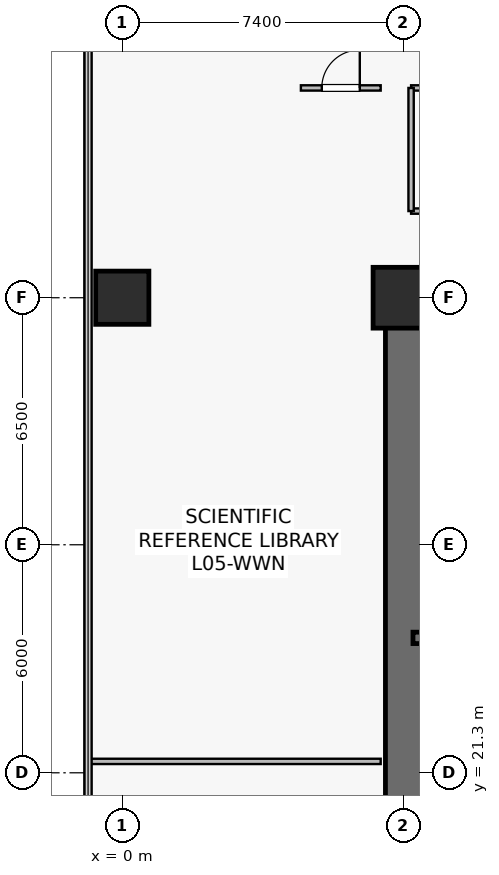
"""IFC4 building model, lengths in metres.
Left out: names, types, materials, properties, quantities, classifications, styles, units other than length and angle.
Written with IfcOpenShell. Run it as: python <this file> out.ifc"""

import sys

from ifc_helpers import new_model, si_unit, direction, frame, frame_2d, origin, origin_2d, place, context, subcontext, project, spatial, rectangle, extrude, source, transform, mapped, element, fill, save


model = new_model("IFC4")
c1 = context("Model", 3, precision=1e-05, world=origin(), true_north=direction((0.0, 1.0)))
c2 = subcontext(c1, "Body", "Model", "MODEL_VIEW")
j1 = project(units=[si_unit("LENGTHUNIT", "METRE"), si_unit("PLANEANGLEUNIT", "RADIAN")], contexts=[c1])
p1 = place(None, origin())
s1 = spatial("IfcSite", under=j1, at=p1, CompositionType="ELEMENT")
p2 = place(p1, origin())
s2 = spatial("IfcBuilding", under=s1, at=p2, CompositionType="ELEMENT")
p3 = place(p2, frame((0.0, 0.0, 19.8)))
s3 = spatial("IfcBuildingStorey", under=s2, at=p3, CompositionType="ELEMENT", Elevation=19.8)
p4 = place(p3, frame((6.925, 33.8, 0.0), z_axis=(0.0, 0.0, 1.0), x_axis=(1.0, 0.0, 0.0)))
e1 = element("IfcWall", 1, at=p4, inside=s3, PredefinedType="SHEAR", context=c2, shape_type="SweptSolid", body=[
    extrude(rectangle(XDim=15.75, YDim=0.95, at=frame_2d((7.875, 0.0))), origin(), (0.0, 0.0, 1.0), 5.08),
])
p5 = place(p4, frame((8.525, 0.0, 0.0)))
e2 = element("IfcOpeningElement", 2, at=p5, cuts=e1, PredefinedType="OPENING", context=c2, shape_type="SweptSolid", body=[
    extrude(rectangle(XDim=0.95, YDim=2.15, at=frame_2d((0.475, 1.075))), frame((0.0, 0.485, 0.0), z_axis=(0.0, -1.0, 0.0), x_axis=(1.0, 0.0, 0.0)), (0.0, 0.0, 1.0), 0.97),
])
p6 = place(p4, frame((12.065, 0.0, 0.0)))
e3 = element("IfcOpeningElement", 3, at=p6, cuts=e1, PredefinedType="OPENING", context=c2, shape_type="SweptSolid", body=[
    extrude(rectangle(XDim=0.95, YDim=2.15, at=frame_2d((0.475, 1.075))), frame((0.0, 0.485, 0.0), z_axis=(0.0, -1.0, 0.0), x_axis=(1.0, 0.0, 0.0)), (0.0, 0.0, 1.0), 0.97),
])
p7 = place(p3, frame((7.4, 15.275, 0.0), z_axis=(0.0, 0.0, 1.0), x_axis=(0.0, 1.0, 0.0)))
e4 = element("IfcWall", 4, at=p7, inside=s3, PredefinedType="SHEAR", context=c2, shape_type="SweptSolid", body=[
    extrude(rectangle(XDim=18.05, YDim=0.95, at=frame_2d((9.025, 0.0))), origin(), (0.0, 0.0, 1.0), 5.08),
])
p8 = place(p3, frame((7.65, 24.85, 0.0), z_axis=(0.0, 0.0, 1.0), x_axis=(1.0, 0.0, 0.0)))
e5 = element("IfcWall", 5, at=p8, inside=s3, PredefinedType="SHEAR", context=c2, shape_type="SweptSolid", body=[
    extrude(rectangle(XDim=3.8, YDim=0.3, at=frame_2d((1.9, 0.0))), origin(), (0.0, 0.0, 1.0), 5.08),
])
m1 = source(origin(), c2, "Body", "SweptSolid", [
    extrude(rectangle(XDim=1.6, YDim=1.6, at=origin_2d()), origin(), (0.0, 0.0, 1.0), 5.4),
])
p9 = place(p3, frame((7.4, 33.8, 0.0), z_axis=(0.0, 0.0, 1.0), x_axis=(1.0, 0.0, 0.0)))
e6 = element("IfcColumn", 6, at=p9, inside=s3, PredefinedType="COLUMN", context=c2, shape_type="MappedRepresentation", body=[
    mapped(m1, transform((0.0, 0.0, 0.0), scale=1.0)),
])
m2 = source(origin(), c2, "Body", "SweptSolid", [
    extrude(rectangle(XDim=1.4, YDim=1.4, at=origin_2d()), origin(), (0.0, 0.0, 1.0), 5.4),
])
p10 = place(p3, frame((0.0, 33.8, 0.0), z_axis=(0.0, 0.0, 1.0), x_axis=(1.0, 0.0, 0.0)))
e7 = element("IfcColumn", 7, at=p10, inside=s3, PredefinedType="COLUMN", context=c2, shape_type="MappedRepresentation", body=[
    mapped(m2, transform((0.0, 0.0, 0.0), scale=1.0)),
])
p11 = place(p3, frame((7.6, 39.32, 0.0), z_axis=(0.0, 0.0, 1.0), x_axis=(1.0, 0.0, 0.0)))
e8 = element("IfcWall", 8, at=p11, inside=s3, PredefinedType="PARTITIONING", context=c2, shape_type="SweptSolid", body=[
    extrude(rectangle(XDim=14.45, YDim=0.14, at=frame_2d((7.225, 0.0))), origin(), (0.0, 0.0, 1.0), 4.365),
])
p12 = place(p11, frame((6.675, 0.0, 0.0)))
e9 = element("IfcOpeningElement", 9, at=p12, cuts=e8, PredefinedType="OPENING", context=c2, shape_type="SweptSolid", body=[
    extrude(rectangle(XDim=1.1, YDim=2.18, at=frame_2d((0.55, 1.09))), frame((0.0, 0.08, 0.0), z_axis=(0.0, -1.0, 0.0), x_axis=(1.0, 0.0, 0.0)), (0.0, 0.0, 1.0), 0.16),
])
p13 = place(p3, frame((7.6, 36.08, 0.0), z_axis=(0.0, 0.0, 1.0), x_axis=(1.0, 0.0, 0.0)))
e10 = element("IfcWall", 10, at=p13, inside=s3, PredefinedType="PARTITIONING", context=c2, shape_type="SweptSolid", body=[
    extrude(rectangle(XDim=14.45, YDim=0.14, at=frame_2d((7.225, 0.0))), origin(), (0.0, 0.0, 1.0), 4.365),
])
p14 = place(p3, frame((7.6, 36.08, 0.0), z_axis=(0.0, 0.0, 1.0), x_axis=(0.0, 1.0, 0.0)))
e11 = element("IfcWall", 11, at=p14, inside=s3, PredefinedType="PARTITIONING", context=c2, shape_type="SweptSolid", body=[
    extrude(rectangle(XDim=3.24, YDim=0.14, at=frame_2d((1.62, 0.0))), origin(), (0.0, 0.0, 1.0), 4.365),
])
p15 = place(p3, frame((-0.85, 21.6, 0.0), z_axis=(0.0, 0.0, 1.0), x_axis=(1.0, 0.0, 0.0)))
e12 = element("IfcWall", 12, at=p15, inside=s3, PredefinedType="PARTITIONING", context=c2, shape_type="SweptSolid", body=[
    extrude(rectangle(XDim=7.65, YDim=0.14, at=frame_2d((3.825, 0.0))), origin(), (0.0, 0.0, 1.0), 4.465),
])
p16 = place(p3, frame((4.7, 39.32, 0.0), z_axis=(0.0, 0.0, 1.0), x_axis=(1.0, 0.0, 0.0)))
e13 = element("IfcWall", 13, at=p16, inside=s3, PredefinedType="PARTITIONING", context=c2, shape_type="SweptSolid", body=[
    extrude(rectangle(XDim=2.1, YDim=0.14, at=frame_2d((1.05, 0.0))), origin(), (0.0, 0.0, 1.0), 5.08),
])
p17 = place(p16, frame((0.55, 0.0, 0.0)))
e14 = element("IfcOpeningElement", 14, at=p17, cuts=e13, PredefinedType="OPENING", context=c2, shape_type="SweptSolid", body=[
    extrude(rectangle(XDim=1.0, YDim=2.15, at=frame_2d((0.5, 1.075))), frame((0.0, 0.08, 0.0), z_axis=(0.0, -1.0, 0.0), x_axis=(1.0, 0.0, 0.0)), (0.0, 0.0, 1.0), 0.16),
])
m3 = source(origin(), c2, "Body", "SweptSolid", [
    extrude(rectangle(XDim=1.0, YDim=2.15, at=frame_2d((0.5, 1.075))), frame((0.0, 0.025, 0.0), z_axis=(0.0, -1.0, 0.0), x_axis=(1.0, 0.0, 0.0)), (0.0, 0.0, 1.0), 0.05),
])
p18 = place(p17, origin())
e15 = element("IfcDoor", 15, at=p18, inside=s3, OperationType="SINGLE_SWING_RIGHT", PredefinedType="DOOR", context=c2, shape_type="MappedRepresentation", body=[
    mapped(m3, transform((0.0, 0.0, 0.0), scale=1.0)),
])
fill(e14, e15)
save(model, sys.argv[1])
